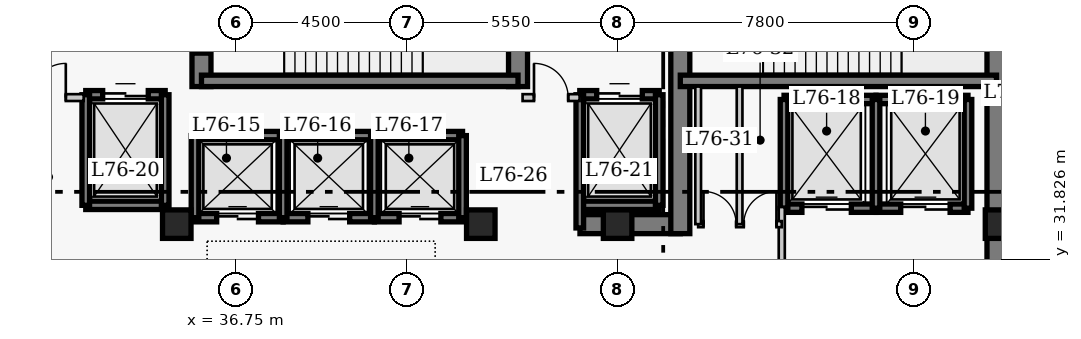
"""IFC4 building model, lengths in metres.
Left out: names, types, materials, properties, quantities, classifications, styles, units other than length and angle.
Written with IfcOpenShell. Run it as: python <this file> out.ifc"""

import sys

from ifc_helpers import new_model, si_unit, direction, frame, frame_2d, origin, origin_2d, place, context, subcontext, project, spatial, rectangle, extrude, element, fill, save


model = new_model("IFC4")
c1 = context("Model", 3, precision=1e-05, world=origin(), true_north=direction((0.0, 1.0)))
c2 = subcontext(c1, "Body", "Model", "MODEL_VIEW")
j1 = project(units=[si_unit("LENGTHUNIT", "METRE"), si_unit("PLANEANGLEUNIT", "RADIAN")], contexts=[c1])
p1 = place(None, origin())
s1 = spatial("IfcSite", under=j1, at=p1, CompositionType="ELEMENT")
p2 = place(p1, origin())
s2 = spatial("IfcBuilding", under=s1, at=p2, CompositionType="ELEMENT")
p3 = place(p2, frame((0.0, 0.0, 306.6)))
s3 = spatial("IfcBuildingStorey", under=s2, at=p3, CompositionType="ELEMENT", Elevation=306.6)
p4 = place(p3, frame((56.77, 27.05, 0.0), z_axis=(0.0, 0.0, 1.0), x_axis=(0.0, 1.0, 0.0)))
e1 = element("IfcWall", 1, at=p4, inside=s3, PredefinedType="SHEAR", context=c2, shape_type="SweptSolid", body=[
    extrude(rectangle(XDim=13.52, YDim=0.5, at=frame_2d((6.76, 0.0))), origin(), (0.0, 0.0, 1.0), 4.8),
])
p5 = place(p3, frame((45.81, 32.75, 0.0), z_axis=(0.0, 0.0, 1.0), x_axis=(1.0, 0.0, 0.0)))
e2 = element("IfcWall", 2, at=p5, inside=s3, PredefinedType="SHEAR", context=c2, shape_type="SweptSolid", body=[
    extrude(rectangle(XDim=2.64, YDim=0.5, at=frame_2d((1.32, 0.0))), origin(), (0.0, 0.0, 1.0), 4.8),
])
p6 = place(p3, frame((35.85, 36.37, 0.0), z_axis=(0.0, 0.0, 1.0), x_axis=(0.0, 1.0, 0.0)))
e3 = element("IfcWall", 3, at=p6, inside=s3, PredefinedType="SHEAR", context=c2, shape_type="SweptSolid", body=[
    extrude(rectangle(XDim=3.95, YDim=0.5, at=frame_2d((1.975, 0.0))), origin(), (0.0, 0.0, 1.0), 4.8),
])
p7 = place(p6, frame((0.88, 0.0, 0.0)))
e4 = element("IfcOpeningElement", 4, at=p7, cuts=e3, PredefinedType="OPENING", context=c2, shape_type="SweptSolid", body=[
    extrude(rectangle(XDim=1.1, YDim=2.15, at=frame_2d((0.55, 1.075))), frame((0.0, 0.26, 0.0), z_axis=(0.0, -1.0, 0.0), x_axis=(1.0, 0.0, 0.0)), (0.0, 0.0, 1.0), 0.52),
])
p8 = place(p3, frame((44.18, 36.37, 0.0), z_axis=(0.0, 0.0, 1.0), x_axis=(0.0, 1.0, 0.0)))
e5 = element("IfcWall", 5, at=p8, inside=s3, PredefinedType="SHEAR", context=c2, shape_type="SweptSolid", body=[
    extrude(rectangle(XDim=3.95, YDim=0.5, at=frame_2d((1.975, 0.0))), origin(), (0.0, 0.0, 1.0), 4.8),
])
p9 = place(p3, frame((48.45, 32.5, 0.0), z_axis=(0.0, 0.0, 1.0), x_axis=(0.0, 1.0, 0.0)))
e6 = element("IfcWall", 6, at=p9, inside=s3, PredefinedType="SHEAR", context=c2, shape_type="SweptSolid", body=[
    extrude(rectangle(XDim=7.82, YDim=0.5, at=frame_2d((3.91, 0.0))), origin(), (0.0, 0.0, 1.0), 4.8),
])
p10 = place(p9, frame((5.7, 0.0, 0.0)))
e7 = element("IfcOpeningElement", 7, at=p10, cuts=e6, PredefinedType="OPENING", context=c2, shape_type="SweptSolid", body=[
    extrude(rectangle(XDim=1.1, YDim=2.15, at=frame_2d((0.55, 1.075))), frame((0.0, 0.26, 0.0), z_axis=(0.0, -1.0, 0.0), x_axis=(1.0, 0.0, 0.0)), (0.0, 0.0, 1.0), 0.52),
])
p11 = place(p3, frame((35.85, 36.52, 0.0), z_axis=(0.0, 0.0, 1.0), x_axis=(1.0, 0.0, 0.0)))
e8 = element("IfcWall", 8, at=p11, inside=s3, PredefinedType="SHEAR", context=c2, shape_type="SweptSolid", body=[
    extrude(rectangle(XDim=8.33, YDim=0.3, at=frame_2d((4.165, 0.0))), origin(), (0.0, 0.0, 1.0), 4.8),
])
p12 = place(p3, frame((48.45, 36.52, 0.0), z_axis=(0.0, 0.0, 1.0), x_axis=(1.0, 0.0, 0.0)))
e9 = element("IfcWall", 9, at=p12, inside=s3, PredefinedType="SHEAR", context=c2, shape_type="SweptSolid", body=[
    extrude(rectangle(XDim=8.32, YDim=0.3, at=frame_2d((4.16, 0.0))), origin(), (0.0, 0.0, 1.0), 4.8),
])
for number, where, z_axis, x_axis in (
    (10, (35.2, 32.75, 0.0), (0.0, 0.0, 1.0), (1.0, 0.0, 0.0)),
    (11, (43.2, 32.75, 0.0), (0.0, 0.0, 1.0), (1.0, 0.0, 0.0)),
    (12, (46.8, 32.75, 0.0), (0.0, 0.0, 1.0), (1.0, 0.0, 0.0)),
    (13, (56.85, 32.75, 0.0), (0.0, 0.0, 1.0), (1.0, 0.0, 0.0)),
):
    element("IfcColumn", number, at=place(p3, frame(where, z_axis=z_axis, x_axis=x_axis)), inside=s3, PredefinedType="COLUMN", context=c2, shape_type="SweptSolid", body=[
        extrude(rectangle(XDim=0.75, YDim=0.75, at=origin_2d()), origin(), (0.0, 0.0, 1.0), 4.8),
    ])
p13 = place(p3, frame((35.68, 35.08, 0.0), z_axis=(0.0, 0.0, 1.0), x_axis=(1.0, 0.0, 0.0)))
e14 = element("IfcWall", 14, at=p13, inside=s3, PredefinedType="SHEAR", context=c2, shape_type="SweptSolid", body=[
    extrude(rectangle(XDim=2.32, YDim=0.22, at=frame_2d((1.16, 0.0))), origin(), (0.0, 0.0, 1.0), 4.8),
])
p14 = place(p3, frame((35.68, 32.92, 0.0), z_axis=(0.0, 0.0, 1.0), x_axis=(1.0, 0.0, 0.0)))
e15 = element("IfcWall", 15, at=p14, inside=s3, PredefinedType="SHEAR", context=c2, shape_type="SweptSolid", body=[
    extrude(rectangle(XDim=2.32, YDim=0.22, at=frame_2d((1.16, 0.0))), origin(), (0.0, 0.0, 1.0), 4.8),
])
p15 = place(p14, frame((0.57, 0.0, 0.0)))
e16 = element("IfcOpeningElement", 16, at=p15, cuts=e15, PredefinedType="OPENING", context=c2, shape_type="SweptSolid", body=[
    extrude(rectangle(XDim=1.1, YDim=2.15, at=frame_2d((0.55, 1.075))), frame((0.0, 0.12, 0.0), z_axis=(0.0, -1.0, 0.0), x_axis=(1.0, 0.0, 0.0)), (0.0, 0.0, 1.0), 0.24),
])
p16 = place(p3, frame((35.68, 32.92, 0.0), z_axis=(0.0, 0.0, 1.0), x_axis=(0.0, 1.0, 0.0)))
e17 = element("IfcWall", 17, at=p16, inside=s3, PredefinedType="SHEAR", context=c2, shape_type="SweptSolid", body=[
    extrude(rectangle(XDim=2.16, YDim=0.2, at=frame_2d((1.08, 0.0))), origin(), (0.0, 0.0, 1.0), 4.8),
])
p17 = place(p3, frame((38.0, 35.08, 0.0), z_axis=(0.0, 0.0, 1.0), x_axis=(1.0, 0.0, 0.0)))
e18 = element("IfcWall", 18, at=p17, inside=s3, PredefinedType="SHEAR", context=c2, shape_type="SweptSolid", body=[
    extrude(rectangle(XDim=2.4, YDim=0.22, at=frame_2d((1.2, 0.0))), origin(), (0.0, 0.0, 1.0), 4.8),
])
p18 = place(p3, frame((38.0, 32.92, 0.0), z_axis=(0.0, 0.0, 1.0), x_axis=(1.0, 0.0, 0.0)))
e19 = element("IfcWall", 19, at=p18, inside=s3, PredefinedType="SHEAR", context=c2, shape_type="SweptSolid", body=[
    extrude(rectangle(XDim=2.4, YDim=0.22, at=frame_2d((1.2, 0.0))), origin(), (0.0, 0.0, 1.0), 4.8),
])
p19 = place(p18, frame((0.65, 0.0, 0.0)))
e20 = element("IfcOpeningElement", 20, at=p19, cuts=e19, PredefinedType="OPENING", context=c2, shape_type="SweptSolid", body=[
    extrude(rectangle(XDim=1.1, YDim=2.15, at=frame_2d((0.55, 1.075))), frame((0.0, 0.12, 0.0), z_axis=(0.0, -1.0, 0.0), x_axis=(1.0, 0.0, 0.0)), (0.0, 0.0, 1.0), 0.24),
])
p20 = place(p3, frame((38.0, 32.92, 0.0), z_axis=(0.0, 0.0, 1.0), x_axis=(0.0, 1.0, 0.0)))
e21 = element("IfcWall", 21, at=p20, inside=s3, PredefinedType="SHEAR", context=c2, shape_type="SweptSolid", body=[
    extrude(rectangle(XDim=2.16, YDim=0.2, at=frame_2d((1.08, 0.0))), origin(), (0.0, 0.0, 1.0), 4.8),
])
p21 = place(p3, frame((40.4, 35.08, 0.0), z_axis=(0.0, 0.0, 1.0), x_axis=(1.0, 0.0, 0.0)))
e22 = element("IfcWall", 22, at=p21, inside=s3, PredefinedType="SHEAR", context=c2, shape_type="SweptSolid", body=[
    extrude(rectangle(XDim=2.32, YDim=0.22, at=frame_2d((1.16, 0.0))), origin(), (0.0, 0.0, 1.0), 4.8),
])
p22 = place(p3, frame((40.4, 32.92, 0.0), z_axis=(0.0, 0.0, 1.0), x_axis=(1.0, 0.0, 0.0)))
e23 = element("IfcWall", 23, at=p22, inside=s3, PredefinedType="SHEAR", context=c2, shape_type="SweptSolid", body=[
    extrude(rectangle(XDim=2.32, YDim=0.22, at=frame_2d((1.16, 0.0))), origin(), (0.0, 0.0, 1.0), 4.8),
])
p23 = place(p22, frame((0.65, 0.0, 0.0)))
e24 = element("IfcOpeningElement", 24, at=p23, cuts=e23, PredefinedType="OPENING", context=c2, shape_type="SweptSolid", body=[
    extrude(rectangle(XDim=1.1, YDim=2.15, at=frame_2d((0.55, 1.075))), frame((0.0, 0.12, 0.0), z_axis=(0.0, -1.0, 0.0), x_axis=(1.0, 0.0, 0.0)), (0.0, 0.0, 1.0), 0.24),
])
for number, where, z_axis, x_axis in (
    (25, (40.4, 32.92, 0.0), (0.0, 0.0, 1.0), (0.0, 1.0, 0.0)),
    (26, (42.72, 32.92, 0.0), (0.0, 0.0, 1.0), (0.0, 1.0, 0.0)),
):
    element("IfcWall", number, at=place(p3, frame(where, z_axis=z_axis, x_axis=x_axis)), inside=s3, PredefinedType="SHEAR", context=c2, shape_type="SweptSolid", body=[
        extrude(rectangle(XDim=2.16, YDim=0.2, at=frame_2d((1.08, 0.0))), origin(), (0.0, 0.0, 1.0), 4.8),
    ])
p24 = place(p3, frame((51.18, 36.03, 0.0), z_axis=(0.0, 0.0, 1.0), x_axis=(1.0, 0.0, 0.0)))
e27 = element("IfcWall", 27, at=p24, inside=s3, PredefinedType="SHEAR", context=c2, shape_type="SweptSolid", body=[
    extrude(rectangle(XDim=2.42, YDim=0.22, at=frame_2d((1.21, 0.0))), origin(), (0.0, 0.0, 1.0), 4.8),
])
p25 = place(p3, frame((51.18, 33.17, 0.0), z_axis=(0.0, 0.0, 1.0), x_axis=(1.0, 0.0, 0.0)))
e28 = element("IfcWall", 28, at=p25, inside=s3, PredefinedType="SHEAR", context=c2, shape_type="SweptSolid", body=[
    extrude(rectangle(XDim=2.42, YDim=0.22, at=frame_2d((1.21, 0.0))), origin(), (0.0, 0.0, 1.0), 4.8),
])
p26 = place(p25, frame((0.47, 0.0, 0.0)))
e29 = element("IfcOpeningElement", 29, at=p26, cuts=e28, PredefinedType="OPENING", context=c2, shape_type="SweptSolid", body=[
    extrude(rectangle(XDim=1.3, YDim=2.15, at=frame_2d((0.65, 1.075))), frame((0.0, 0.12, 0.0), z_axis=(0.0, -1.0, 0.0), x_axis=(1.0, 0.0, 0.0)), (0.0, 0.0, 1.0), 0.24),
])
p27 = place(p3, frame((51.18, 33.17, 0.0), z_axis=(0.0, 0.0, 1.0), x_axis=(0.0, 1.0, 0.0)))
e30 = element("IfcWall", 30, at=p27, inside=s3, PredefinedType="SHEAR", context=c2, shape_type="SweptSolid", body=[
    extrude(rectangle(XDim=2.86, YDim=0.2, at=frame_2d((1.43, 0.0))), origin(), (0.0, 0.0, 1.0), 4.8),
])
p28 = place(p3, frame((53.6, 36.03, 0.0), z_axis=(0.0, 0.0, 1.0), x_axis=(1.0, 0.0, 0.0)))
e31 = element("IfcWall", 31, at=p28, inside=s3, PredefinedType="SHEAR", context=c2, shape_type="SweptSolid", body=[
    extrude(rectangle(XDim=2.42, YDim=0.22, at=frame_2d((1.21, 0.0))), origin(), (0.0, 0.0, 1.0), 4.8),
])
p29 = place(p3, frame((53.6, 33.17, 0.0), z_axis=(0.0, 0.0, 1.0), x_axis=(1.0, 0.0, 0.0)))
e32 = element("IfcWall", 32, at=p29, inside=s3, PredefinedType="SHEAR", context=c2, shape_type="SweptSolid", body=[
    extrude(rectangle(XDim=2.42, YDim=0.22, at=frame_2d((1.21, 0.0))), origin(), (0.0, 0.0, 1.0), 4.8),
])
p30 = place(p29, frame((0.65, 0.0, 0.0)))
e33 = element("IfcOpeningElement", 33, at=p30, cuts=e32, PredefinedType="OPENING", context=c2, shape_type="SweptSolid", body=[
    extrude(rectangle(XDim=1.3, YDim=2.15, at=frame_2d((0.65, 1.075))), frame((0.0, 0.12, 0.0), z_axis=(0.0, -1.0, 0.0), x_axis=(1.0, 0.0, 0.0)), (0.0, 0.0, 1.0), 0.24),
])
for number, where, z_axis, x_axis in (
    (34, (53.6, 33.17, 0.0), (0.0, 0.0, 1.0), (0.0, 1.0, 0.0)),
    (35, (56.02, 33.17, 0.0), (0.0, 0.0, 1.0), (0.0, 1.0, 0.0)),
):
    element("IfcWall", number, at=place(p3, frame(where, z_axis=z_axis, x_axis=x_axis)), inside=s3, PredefinedType="SHEAR", context=c2, shape_type="SweptSolid", body=[
        extrude(rectangle(XDim=2.86, YDim=0.2, at=frame_2d((1.43, 0.0))), origin(), (0.0, 0.0, 1.0), 4.8),
    ])
p31 = place(p3, frame((32.805, 36.155, 0.0), z_axis=(0.0, 0.0, 1.0), x_axis=(1.0, 0.0, 0.0)))
e36 = element("IfcWall", 36, at=p31, inside=s3, PredefinedType="SHEAR", context=c2, shape_type="SweptSolid", body=[
    extrude(rectangle(XDim=2.09, YDim=0.22, at=frame_2d((1.045, 0.0))), origin(), (0.0, 0.0, 1.0), 4.8),
])
p32 = place(p31, frame((0.445, 0.0, 0.0)))
e37 = element("IfcOpeningElement", 37, at=p32, cuts=e36, PredefinedType="OPENING", context=c2, shape_type="SweptSolid", body=[
    extrude(rectangle(XDim=1.2, YDim=2.15, at=frame_2d((0.6, 1.075))), frame((0.0, 0.12, 0.0), z_axis=(0.0, -1.0, 0.0), x_axis=(1.0, 0.0, 0.0)), (0.0, 0.0, 1.0), 0.24),
])
p33 = place(p3, frame((32.805, 33.245, 0.0), z_axis=(0.0, 0.0, 1.0), x_axis=(1.0, 0.0, 0.0)))
e38 = element("IfcWall", 38, at=p33, inside=s3, PredefinedType="SHEAR", context=c2, shape_type="SweptSolid", body=[
    extrude(rectangle(XDim=2.09, YDim=0.22, at=frame_2d((1.045, 0.0))), origin(), (0.0, 0.0, 1.0), 4.8),
])
for number, where, z_axis, x_axis in (
    (39, (32.805, 33.245, 0.0), (0.0, 0.0, 1.0), (0.0, 1.0, 0.0)),
    (40, (34.895, 33.245, 0.0), (0.0, 0.0, 1.0), (0.0, 1.0, 0.0)),
):
    element("IfcWall", number, at=place(p3, frame(where, z_axis=z_axis, x_axis=x_axis)), inside=s3, PredefinedType="SHEAR", context=c2, shape_type="SweptSolid", body=[
        extrude(rectangle(XDim=2.91, YDim=0.2, at=frame_2d((1.455, 0.0))), origin(), (0.0, 0.0, 1.0), 4.8),
    ])
p34 = place(p3, frame((45.805, 36.155, 0.0), z_axis=(0.0, 0.0, 1.0), x_axis=(1.0, 0.0, 0.0)))
e41 = element("IfcWall", 41, at=p34, inside=s3, PredefinedType="SHEAR", context=c2, shape_type="SweptSolid", body=[
    extrude(rectangle(XDim=2.09, YDim=0.22, at=frame_2d((1.045, 0.0))), origin(), (0.0, 0.0, 1.0), 4.8),
])
p35 = place(p34, frame((0.445, 0.0, 0.0)))
e42 = element("IfcOpeningElement", 42, at=p35, cuts=e41, PredefinedType="OPENING", context=c2, shape_type="SweptSolid", body=[
    extrude(rectangle(XDim=1.2, YDim=2.15, at=frame_2d((0.6, 1.075))), frame((0.0, 0.12, 0.0), z_axis=(0.0, -1.0, 0.0), x_axis=(1.0, 0.0, 0.0)), (0.0, 0.0, 1.0), 0.24),
])
p36 = place(p3, frame((45.805, 33.245, 0.0), z_axis=(0.0, 0.0, 1.0), x_axis=(1.0, 0.0, 0.0)))
e43 = element("IfcWall", 43, at=p36, inside=s3, PredefinedType="SHEAR", context=c2, shape_type="SweptSolid", body=[
    extrude(rectangle(XDim=2.09, YDim=0.22, at=frame_2d((1.045, 0.0))), origin(), (0.0, 0.0, 1.0), 4.8),
])
p37 = place(p3, frame((45.805, 32.65, 0.0), z_axis=(0.0, 0.0, 1.0), x_axis=(0.0, 1.0, 0.0)))
e44 = element("IfcWall", 44, at=p37, inside=s3, PredefinedType="SHEAR", context=c2, shape_type="SweptSolid", body=[
    extrude(rectangle(XDim=3.505, YDim=0.2, at=frame_2d((1.752, 0.0))), origin(), (0.0, 0.0, 1.0), 4.8),
])
p38 = place(p3, frame((47.895, 33.245, 0.0), z_axis=(0.0, 0.0, 1.0), x_axis=(0.0, 1.0, 0.0)))
e45 = element("IfcWall", 45, at=p38, inside=s3, PredefinedType="SHEAR", context=c2, shape_type="SweptSolid", body=[
    extrude(rectangle(XDim=2.91, YDim=0.2, at=frame_2d((1.455, 0.0))), origin(), (0.0, 0.0, 1.0), 4.8),
])
p39 = place(p3, frame((30.9, 36.08, 0.0), z_axis=(0.0, 0.0, 1.0), x_axis=(1.0, 0.0, 0.0)))
e46 = element("IfcWall", 46, at=p39, inside=s3, PredefinedType="PARTITIONING", context=c2, shape_type="SweptSolid", body=[
    extrude(rectangle(XDim=1.85, YDim=0.18, at=frame_2d((0.925, 0.0))), origin(), (0.0, 0.0, 1.0), 4.45),
])
p40 = place(p39, frame((0.48, 0.0, 0.0)))
e47 = element("IfcOpeningElement", 47, at=p40, cuts=e46, PredefinedType="OPENING", context=c2, shape_type="SweptSolid", body=[
    extrude(rectangle(XDim=0.9, YDim=2.15, at=frame_2d((0.45, 1.075))), frame((0.0, 0.1, 0.0), z_axis=(0.0, -1.0, 0.0), x_axis=(1.0, 0.0, 0.0)), (0.0, 0.0, 1.0), 0.2),
])
p41 = place(p3, frame((44.3, 36.08, 0.0), z_axis=(0.0, 0.0, 1.0), x_axis=(1.0, 0.0, 0.0)))
e48 = element("IfcWall", 48, at=p41, inside=s3, PredefinedType="PARTITIONING", context=c2, shape_type="SweptSolid", body=[
    extrude(rectangle(XDim=1.5, YDim=0.18, at=frame_2d((0.75, 0.0))), origin(), (0.0, 0.0, 1.0), 4.45),
])
p42 = place(p41, frame((0.3, 0.0, 0.0)))
e49 = element("IfcOpeningElement", 49, at=p42, cuts=e48, PredefinedType="OPENING", context=c2, shape_type="SweptSolid", body=[
    extrude(rectangle(XDim=0.9, YDim=2.15, at=frame_2d((0.45, 1.075))), frame((0.0, 0.1, 0.0), z_axis=(0.0, -1.0, 0.0), x_axis=(1.0, 0.0, 0.0)), (0.0, 0.0, 1.0), 0.2),
])
p43 = place(p3, frame((51.12, 29.5, 0.0), z_axis=(0.0, 0.0, 1.0), x_axis=(0.0, 1.0, 0.0)))
e50 = element("IfcWall", 50, at=p43, inside=s3, PredefinedType="PARTITIONING", context=c2, shape_type="SweptSolid", body=[
    extrude(rectangle(XDim=3.7, YDim=0.16, at=frame_2d((1.85, 0.0))), origin(), (0.0, 0.0, 1.0), 4.45),
])
p44 = place(p43, frame((0.9, 0.0, 0.0)))
e51 = element("IfcOpeningElement", 51, at=p44, cuts=e50, PredefinedType="OPENING", context=c2, shape_type="SweptSolid", body=[
    extrude(rectangle(XDim=1.1, YDim=2.15, at=frame_2d((0.55, 1.075))), frame((0.0, 0.09, 0.0), z_axis=(0.0, -1.0, 0.0), x_axis=(1.0, 0.0, 0.0)), (0.0, 0.0, 1.0), 0.18),
])
p45 = place(p3, frame((48.92, 32.75, 0.0), z_axis=(0.0, 0.0, 1.0), x_axis=(1.0, 0.0, 0.0)))
e52 = element("IfcWall", 52, at=p45, inside=s3, PredefinedType="PARTITIONING", context=c2, shape_type="SweptSolid", body=[
    extrude(rectangle(XDim=2.2, YDim=0.16, at=frame_2d((1.1, 0.0))), origin(), (0.0, 0.0, 1.0), 4.45),
])
p46 = place(p45, frame((0.14, 0.0, 0.0)))
e53 = element("IfcOpeningElement", 53, at=p46, cuts=e52, PredefinedType="OPENING", context=c2, shape_type="SweptSolid", body=[
    extrude(rectangle(XDim=0.86, YDim=2.05, at=frame_2d((0.43, 1.025))), frame((0.0, 0.09, 0.0), z_axis=(0.0, -1.0, 0.0), x_axis=(1.0, 0.0, 0.0)), (0.0, 0.0, 1.0), 0.18),
])
p47 = place(p45, frame((1.2, 0.0, 0.0)))
e54 = element("IfcOpeningElement", 54, at=p47, cuts=e52, PredefinedType="OPENING", context=c2, shape_type="SweptSolid", body=[
    extrude(rectangle(XDim=0.86, YDim=2.05, at=frame_2d((0.43, 1.025))), frame((0.0, 0.09, 0.0), z_axis=(0.0, -1.0, 0.0), x_axis=(1.0, 0.0, 0.0)), (0.0, 0.0, 1.0), 0.18),
])
for number, where, z_axis, x_axis in (
    (55, (48.92, 32.75, 0.0), (0.0, 0.0, 1.0), (0.0, 1.0, 0.0)),
    (56, (50.01, 32.75, 0.0), (0.0, 0.0, 1.0), (0.0, 1.0, 0.0)),
):
    element("IfcWall", number, at=place(p3, frame(where, z_axis=z_axis, x_axis=x_axis)), inside=s3, PredefinedType="PARTITIONING", context=c2, shape_type="SweptSolid", body=[
        extrude(rectangle(XDim=3.62, YDim=0.15, at=frame_2d((1.81, 0.0))), origin(), (0.0, 0.0, 1.0), 4.45),
    ])
p48 = place(p15, origin())
e57 = element("IfcDoor", 57, at=p48, inside=s3, OperationType="DOUBLE_DOOR_SLIDING", PredefinedType="DOOR", context=c2, shape_type="SweptSolid", body=[
    extrude(rectangle(XDim=1.1, YDim=2.15, at=frame_2d((0.55, 1.075))), frame((0.0, 0.025, 0.0), z_axis=(0.0, -1.0, 0.0), x_axis=(1.0, 0.0, 0.0)), (0.0, 0.0, 1.0), 0.05),
])
fill(e16, e57)
p49 = place(p19, origin())
e58 = element("IfcDoor", 58, at=p49, inside=s3, OperationType="DOUBLE_DOOR_SLIDING", PredefinedType="DOOR", context=c2, shape_type="SweptSolid", body=[
    extrude(rectangle(XDim=1.1, YDim=2.15, at=frame_2d((0.55, 1.075))), frame((0.0, 0.025, 0.0), z_axis=(0.0, -1.0, 0.0), x_axis=(1.0, 0.0, 0.0)), (0.0, 0.0, 1.0), 0.05),
])
fill(e20, e58)
p50 = place(p23, origin())
e59 = element("IfcDoor", 59, at=p50, inside=s3, OperationType="DOUBLE_DOOR_SLIDING", PredefinedType="DOOR", context=c2, shape_type="SweptSolid", body=[
    extrude(rectangle(XDim=1.1, YDim=2.15, at=frame_2d((0.55, 1.075))), frame((0.0, 0.025, 0.0), z_axis=(0.0, -1.0, 0.0), x_axis=(1.0, 0.0, 0.0)), (0.0, 0.0, 1.0), 0.05),
])
fill(e24, e59)
p51 = place(p26, origin())
e60 = element("IfcDoor", 60, at=p51, inside=s3, OperationType="DOUBLE_DOOR_SLIDING", PredefinedType="DOOR", context=c2, shape_type="SweptSolid", body=[
    extrude(rectangle(XDim=1.3, YDim=2.15, at=frame_2d((0.65, 1.075))), frame((0.0, 0.025, 0.0), z_axis=(0.0, -1.0, 0.0), x_axis=(1.0, 0.0, 0.0)), (0.0, 0.0, 1.0), 0.05),
])
fill(e29, e60)
p52 = place(p30, origin())
e61 = element("IfcDoor", 61, at=p52, inside=s3, OperationType="DOUBLE_DOOR_SLIDING", PredefinedType="DOOR", context=c2, shape_type="SweptSolid", body=[
    extrude(rectangle(XDim=1.3, YDim=2.15, at=frame_2d((0.65, 1.075))), frame((0.0, 0.025, 0.0), z_axis=(0.0, -1.0, 0.0), x_axis=(1.0, 0.0, 0.0)), (0.0, 0.0, 1.0), 0.05),
])
fill(e33, e61)
p53 = place(p32, origin())
e62 = element("IfcDoor", 62, at=p53, inside=s3, OperationType="DOUBLE_DOOR_SLIDING", PredefinedType="DOOR", context=c2, shape_type="SweptSolid", body=[
    extrude(rectangle(XDim=1.2, YDim=2.15, at=frame_2d((0.6, 1.075))), frame((0.0, 0.025, 0.0), z_axis=(0.0, -1.0, 0.0), x_axis=(1.0, 0.0, 0.0)), (0.0, 0.0, 1.0), 0.05),
])
fill(e37, e62)
p54 = place(p35, origin())
e63 = element("IfcDoor", 63, at=p54, inside=s3, OperationType="DOUBLE_DOOR_SLIDING", PredefinedType="DOOR", context=c2, shape_type="SweptSolid", body=[
    extrude(rectangle(XDim=1.2, YDim=2.15, at=frame_2d((0.6, 1.075))), frame((0.0, 0.025, 0.0), z_axis=(0.0, -1.0, 0.0), x_axis=(1.0, 0.0, 0.0)), (0.0, 0.0, 1.0), 0.05),
])
fill(e42, e63)
p55 = place(p40, origin())
e64 = element("IfcDoor", 64, at=p55, inside=s3, OperationType="SINGLE_SWING_RIGHT", PredefinedType="DOOR", context=c2, shape_type="SweptSolid", body=[
    extrude(rectangle(XDim=0.9, YDim=2.15, at=frame_2d((0.45, 1.075))), frame((0.0, 0.025, 0.0), z_axis=(0.0, -1.0, 0.0), x_axis=(1.0, 0.0, 0.0)), (0.0, 0.0, 1.0), 0.05),
])
fill(e47, e64)
p56 = place(p42, origin())
e65 = element("IfcDoor", 65, at=p56, inside=s3, OperationType="SINGLE_SWING_LEFT", PredefinedType="DOOR", context=c2, shape_type="SweptSolid", body=[
    extrude(rectangle(XDim=0.9, YDim=2.15, at=frame_2d((0.45, 1.075))), frame((0.0, 0.025, 0.0), z_axis=(0.0, -1.0, 0.0), x_axis=(1.0, 0.0, 0.0)), (0.0, 0.0, 1.0), 0.05),
])
fill(e49, e65)
p57 = place(p46, origin())
e66 = element("IfcDoor", 66, at=p57, inside=s3, OperationType="SINGLE_SWING_LEFT", PredefinedType="DOOR", context=c2, shape_type="SweptSolid", body=[
    extrude(rectangle(XDim=0.86, YDim=2.05, at=frame_2d((0.43, 1.025))), frame((0.0, 0.025, 0.0), z_axis=(0.0, -1.0, 0.0), x_axis=(1.0, 0.0, 0.0)), (0.0, 0.0, 1.0), 0.05),
])
fill(e53, e66)
p58 = place(p47, origin())
e67 = element("IfcDoor", 67, at=p58, inside=s3, OperationType="SINGLE_SWING_RIGHT", PredefinedType="DOOR", context=c2, shape_type="SweptSolid", body=[
    extrude(rectangle(XDim=0.86, YDim=2.05, at=frame_2d((0.43, 1.025))), frame((0.0, 0.025, 0.0), z_axis=(0.0, -1.0, 0.0), x_axis=(1.0, 0.0, 0.0)), (0.0, 0.0, 1.0), 0.05),
])
fill(e54, e67)
p59 = place(p7, origin())
e68 = element("IfcDoor", 68, at=p59, inside=s3, OperationType="SINGLE_SWING_RIGHT", PredefinedType="DOOR", context=c2, shape_type="SweptSolid", body=[
    extrude(rectangle(XDim=1.1, YDim=2.15, at=frame_2d((0.55, 1.075))), frame((0.0, 0.025, 0.0), z_axis=(0.0, -1.0, 0.0), x_axis=(1.0, 0.0, 0.0)), (0.0, 0.0, 1.0), 0.05),
])
fill(e4, e68)
save(model, sys.argv[1])
